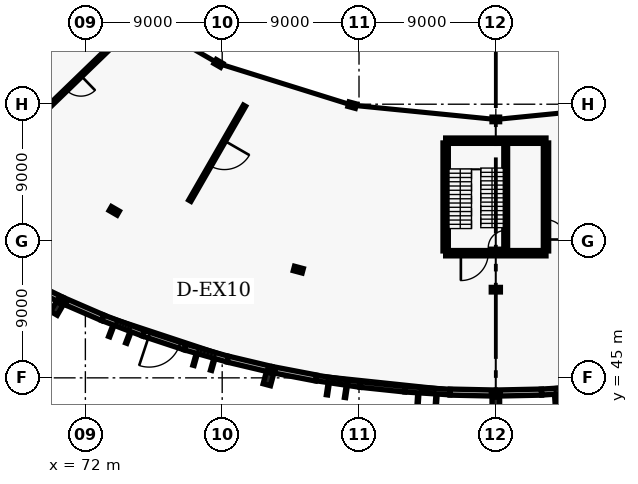
"""IFC4 building model, lengths in metres.
Left out: names, types, materials, properties, quantities, classifications, styles, units other than length and angle.
Written with IfcOpenShell. Run it as: python <this file> out.ifc"""

import sys

from ifc_helpers import new_model, si_unit, direction, frame, frame_2d, origin, origin_2d, place, context, subcontext, project, spatial, rectangle, i_section, extrude, element, fill, save


model = new_model("IFC4")
c1 = context("Model", 3, precision=1e-05, world=origin(), true_north=direction((0.0, 1.0)))
c2 = subcontext(c1, "Body", "Model", "MODEL_VIEW")
j1 = project(units=[si_unit("LENGTHUNIT", "METRE"), si_unit("PLANEANGLEUNIT", "RADIAN")], contexts=[c1])
p1 = place(None, origin())
s1 = spatial("IfcSite", under=j1, at=p1, CompositionType="ELEMENT")
p2 = place(p1, origin())
s2 = spatial("IfcBuilding", under=s1, at=p2, CompositionType="ELEMENT")
p3 = place(p2, origin())
s3 = spatial("IfcBuildingStorey", under=s2, at=p3, CompositionType="ELEMENT", Elevation=0.0)
p4 = place(p3, frame((80.75, 65.684, 0.0), z_axis=(0.0, 0.0, 1.0), x_axis=(-0.5, -0.866025403784, 0.0)))
e1 = element("IfcColumn", 1, at=p4, inside=s3, PredefinedType="COLUMN", context=c2, shape_type="SweptSolid", body=[
    extrude(i_section(OverallWidth=0.3, OverallDepth=0.5, WebThickness=0.014, FlangeThickness=0.028, FilletRadius=0.027, at=origin_2d()), origin(), (0.0, 0.0, 1.0), 5.4),
])
for number, where, z_axis, x_axis in (
    (2, (73.9, 55.985, 0.0), (0.0, 0.0, 1.0), (-0.5, -0.866, 0.0)),
    (3, (70.5, 50.096, 0.0), (0.0, 0.0, 1.0), (-0.5, -0.866, 0.0)),
):
    element("IfcColumn", number, at=place(p3, frame(where, z_axis=z_axis, x_axis=x_axis)), inside=s3, PredefinedType="COLUMN", context=c2, shape_type="SweptSolid", body=[
        extrude(i_section(OverallWidth=0.3, OverallDepth=0.6, WebThickness=0.015, FlangeThickness=0.03, FilletRadius=0.027, at=origin_2d()), origin(), (0.0, 0.0, 1.0), 5.4),
    ])
p5 = place(p3, frame((70.119, 49.569, 0.0), z_axis=(0.0, 0.0, 1.0), x_axis=(-0.5, -0.866025403784, 0.0)))
e4 = element("IfcColumn", 4, at=p5, inside=s3, PredefinedType="PILASTER", context=c2, shape_type="SweptSolid", body=[
    extrude(rectangle(XDim=0.75, YDim=0.5, at=origin_2d()), origin(), (0.0, 0.0, 1.0), 5.15),
])
p6 = place(p3, frame((89.553, 62.937, 0.0), z_axis=(0.0, 0.0, 1.0), x_axis=(-0.258819045103, -0.965925826289, 0.0)))
e5 = element("IfcColumn", 5, at=p6, inside=s3, PredefinedType="COLUMN", context=c2, shape_type="SweptSolid", body=[
    extrude(i_section(OverallWidth=0.3, OverallDepth=0.5, WebThickness=0.014, FlangeThickness=0.028, FilletRadius=0.027, at=origin_2d()), origin(), (0.0, 0.0, 1.0), 5.4),
])
p7 = place(p3, frame((86.007, 52.119, 0.0), z_axis=(0.0, 0.0, 1.0), x_axis=(-0.258819045103, -0.965925826289, 0.0)))
e6 = element("IfcColumn", 6, at=p7, inside=s3, PredefinedType="COLUMN", context=c2, shape_type="SweptSolid", body=[
    extrude(i_section(OverallWidth=0.3, OverallDepth=0.6, WebThickness=0.015, FlangeThickness=0.03, FilletRadius=0.027, at=origin_2d()), origin(), (0.0, 0.0, 1.0), 5.4),
])
p8 = place(p3, frame((84.247, 45.55, 0.0), z_axis=(0.0, 0.0, 1.0), x_axis=(-0.258819045103, -0.965925826289, 0.0)))
e7 = element("IfcColumn", 7, at=p8, inside=s3, PredefinedType="COLUMN", context=c2, shape_type="SweptSolid", body=[
    extrude(i_section(OverallWidth=0.3, OverallDepth=0.5, WebThickness=0.014, FlangeThickness=0.028, FilletRadius=0.027, at=origin_2d()), origin(), (0.0, 0.0, 1.0), 5.4),
])
p9 = place(p3, frame((84.04, 44.934, 0.0), z_axis=(0.0, 0.0, 1.0), x_axis=(-0.258819045103, -0.965925826289, 0.0)))
e8 = element("IfcColumn", 8, at=p9, inside=s3, PredefinedType="PILASTER", context=c2, shape_type="SweptSolid", body=[
    extrude(rectangle(XDim=0.8, YDim=0.5, at=origin_2d()), origin(), (0.0, 0.0, 1.0), 5.15),
])
p10 = place(p3, frame((99.0, 62.0, 0.0), z_axis=(0.0, 0.0, 1.0), x_axis=(0.0, -1.0, 0.0)))
e9 = element("IfcColumn", 9, at=p10, inside=s3, PredefinedType="COLUMN", context=c2, shape_type="SweptSolid", body=[
    extrude(i_section(OverallWidth=0.3, OverallDepth=0.5, WebThickness=0.014, FlangeThickness=0.028, FilletRadius=0.027, at=origin_2d()), origin(), (0.0, 0.0, 1.0), 5.4),
])
for number, where, z_axis, x_axis in (
    (10, (99.0, 50.8, 0.0), (0.0, 0.0, 1.0), (0.0, -1.0, 0.0)),
    (11, (99.0, 44.0, 0.0), (0.0, 0.0, 1.0), (0.0, -1.0, 0.0)),
):
    element("IfcColumn", number, at=place(p3, frame(where, z_axis=z_axis, x_axis=x_axis)), inside=s3, PredefinedType="COLUMN", context=c2, shape_type="SweptSolid", body=[
        extrude(i_section(OverallWidth=0.3, OverallDepth=0.6, WebThickness=0.015, FlangeThickness=0.03, FilletRadius=0.027, at=origin_2d()), origin(), (0.0, 0.0, 1.0), 5.4),
    ])
p11 = place(p3, frame((99.0, 43.35, 0.0), z_axis=(0.0, 0.0, 1.0), x_axis=(0.0, -1.0, 0.0)))
e12 = element("IfcColumn", 12, at=p11, inside=s3, PredefinedType="PILASTER", context=c2, shape_type="SweptSolid", body=[
    extrude(rectangle(XDim=0.75, YDim=0.5, at=origin_2d()), origin(), (0.0, 0.0, 1.0), 5.15),
])
p12 = place(p3, frame((67.934, 51.352, 0.0), z_axis=(0.0, 0.0, 1.0), x_axis=(0.898004688797, -0.439985884886, 0.0)))
e13 = element("IfcWall", 13, at=p12, inside=s3, PredefinedType="SOLIDWALL", context=c2, shape_type="SweptSolid", body=[
    extrude(rectangle(XDim=2.816, YDim=0.4, at=frame_2d((1.408, 0.0))), origin(), (0.0, 0.0, 1.0), 4.6),
])
p13 = place(p3, frame((70.536, 50.079, 0.0), z_axis=(0.0, 0.0, 1.0), x_axis=(0.917744542698, -0.397171190229, 0.0)))
e14 = element("IfcWall", 14, at=p13, inside=s3, PredefinedType="SOLIDWALL", context=c2, shape_type="SweptSolid", body=[
    extrude(rectangle(XDim=2.843, YDim=0.4, at=frame_2d((1.421, 0.0))), origin(), (0.0, 0.0, 1.0), 4.6),
])
p14 = place(p3, frame((73.145, 48.95, 0.0), z_axis=(0.0, 0.0, 1.0), x_axis=(0.934663038469, -0.355534814779, 0.0)))
e15 = element("IfcWall", 15, at=p14, inside=s3, PredefinedType="SOLIDWALL", context=c2, shape_type="SweptSolid", body=[
    extrude(rectangle(XDim=2.866, YDim=0.39, at=frame_2d((1.433, 0.0))), origin(), (0.0, 0.0, 1.0), 4.6),
])
p15 = place(p14, frame((0.908, 0.0, 0.95)))
e16 = element("IfcOpeningElement", 16, at=p15, cuts=e15, PredefinedType="OPENING", context=c2, shape_type="SweptSolid", body=[
    extrude(rectangle(XDim=1.05, YDim=1.35, at=frame_2d((0.525, 0.675))), frame((0.0, 0.205, 0.0), z_axis=(0.0, -1.0, 0.0), x_axis=(1.0, 0.0, 0.0)), (0.0, 0.0, 1.0), 0.41),
])
p16 = place(p3, frame((75.824, 47.931, 0.0), z_axis=(0.0, 0.0, 1.0), x_axis=(0.949374423455, -0.314146787489, 0.0)))
e17 = element("IfcWall", 17, at=p16, inside=s3, PredefinedType="SOLIDWALL", context=c2, shape_type="SweptSolid", body=[
    extrude(rectangle(XDim=2.887, YDim=0.39, at=frame_2d((1.444, 0.0))), origin(), (0.0, 0.0, 1.0), 4.6),
])
p17 = place(p16, frame((0.394, 0.0, 0.0)))
e18 = element("IfcOpeningElement", 18, at=p17, cuts=e17, PredefinedType="OPENING", context=c2, shape_type="SweptSolid", body=[
    extrude(rectangle(XDim=2.1, YDim=2.35, at=frame_2d((1.05, 1.175))), frame((0.0, 0.205, 0.0), z_axis=(0.0, -1.0, 0.0), x_axis=(1.0, 0.0, 0.0)), (0.0, 0.0, 1.0), 0.41),
])
p18 = place(p3, frame((78.565, 47.024, 0.0), z_axis=(0.0, 0.0, 1.0), x_axis=(0.962286948756, -0.272036446555, 0.0)))
e19 = element("IfcWall", 19, at=p18, inside=s3, PredefinedType="SOLIDWALL", context=c2, shape_type="SweptSolid", body=[
    extrude(rectangle(XDim=2.908, YDim=0.39, at=frame_2d((1.454, 0.0))), origin(), (0.0, 0.0, 1.0), 4.6),
])
p19 = place(p18, frame((0.854, 0.0, 0.95)))
e20 = element("IfcOpeningElement", 20, at=p19, cuts=e19, PredefinedType="OPENING", context=c2, shape_type="SweptSolid", body=[
    extrude(rectangle(XDim=1.2, YDim=1.8, at=frame_2d((0.6, 0.9))), frame((0.0, 0.205, 0.0), z_axis=(0.0, -1.0, 0.0), x_axis=(1.0, 0.0, 0.0)), (0.0, 0.0, 1.0), 0.41),
])
p20 = place(p3, frame((81.363, 46.233, 0.0), z_axis=(0.0, 0.0, 1.0), x_axis=(0.973061058114, -0.230547559481, 0.0)))
e21 = element("IfcWall", 21, at=p20, inside=s3, PredefinedType="SOLIDWALL", context=c2, shape_type="SweptSolid", body=[
    extrude(rectangle(XDim=2.923, YDim=0.4, at=frame_2d((1.461, 0.0))), origin(), (0.0, 0.0, 1.0), 4.6),
])
p21 = place(p3, frame((84.286, 45.542, 0.0), z_axis=(0.0, 0.0, 1.0), x_axis=(0.982209662349, -0.187787590612, 0.0)))
e22 = element("IfcWall", 22, at=p21, inside=s3, PredefinedType="SOLIDWALL", context=c2, shape_type="SweptSolid", body=[
    extrude(rectangle(XDim=2.939, YDim=0.4, at=frame_2d((1.47, 0.0))), origin(), (0.0, 0.0, 1.0), 4.6),
])
p22 = place(p3, frame((87.173, 44.99, 0.0), z_axis=(0.0, 0.0, 1.0), x_axis=(0.98927134979, -0.146089686444, 0.0)))
e23 = element("IfcWall", 23, at=p22, inside=s3, PredefinedType="SOLIDWALL", context=c2, shape_type="SweptSolid", body=[
    extrude(rectangle(XDim=2.95, YDim=0.36, at=frame_2d((1.475, 0.0))), origin(), (0.0, 0.0, 1.0), 4.6),
])
p23 = place(p22, frame((0.725, 0.0, 0.95)))
e24 = element("IfcOpeningElement", 24, at=p23, cuts=e23, PredefinedType="OPENING", context=c2, shape_type="SweptSolid", body=[
    extrude(rectangle(XDim=1.5, YDim=2.1, at=frame_2d((0.75, 1.05))), frame((0.0, 0.19, 0.0), z_axis=(0.0, -1.0, 0.0), x_axis=(1.0, 0.0, 0.0)), (0.0, 0.0, 1.0), 0.38),
])
p24 = place(p3, frame((90.091, 44.559, 0.0), z_axis=(0.0, 0.0, 1.0), x_axis=(0.994529838675, -0.10445286011, 0.0)))
e25 = element("IfcWall", 25, at=p24, inside=s3, PredefinedType="SOLIDWALL", context=c2, shape_type="SweptSolid", body=[
    extrude(rectangle(XDim=2.959, YDim=0.36, at=frame_2d((1.479, 0.0))), origin(), (0.0, 0.0, 1.0), 4.6),
])
p25 = place(p3, frame((93.034, 44.25, 0.0), z_axis=(0.0, 0.0, 1.0), x_axis=(0.998008759952, -0.063075471132, 0.0)))
e26 = element("IfcWall", 26, at=p25, inside=s3, PredefinedType="SOLIDWALL", context=c2, shape_type="SweptSolid", body=[
    extrude(rectangle(XDim=2.965, YDim=0.36, at=frame_2d((1.482, 0.0))), origin(), (0.0, 0.0, 1.0), 4.6),
])
p26 = place(p25, frame((0.982, 0.0, 0.95)))
e27 = element("IfcOpeningElement", 27, at=p26, cuts=e26, PredefinedType="OPENING", context=c2, shape_type="SweptSolid", body=[
    extrude(rectangle(XDim=1.0, YDim=1.5, at=frame_2d((0.5, 0.75))), frame((0.0, 0.19, 0.0), z_axis=(0.0, -1.0, 0.0), x_axis=(1.0, 0.0, 0.0)), (0.0, 0.0, 1.0), 0.38),
])
for number, where, z_axis, x_axis in (
    (28, (95.993, 44.063, 0.0), (0.0, 0.0, 1.0), (1.0, -0.021, 0.0)),
    (29, (99.04, 44.0, 0.0), (0.0, 0.0, 1.0), (1.0, 0.021, 0.0)),
):
    element("IfcWall", number, at=place(p3, frame(where, z_axis=z_axis, x_axis=x_axis)), inside=s3, PredefinedType="SOLIDWALL", context=c2, shape_type="SweptSolid", body=[
        extrude(rectangle(XDim=2.968, YDim=0.4, at=frame_2d((1.484, 0.0))), origin(), (0.0, 0.0, 1.0), 4.6),
    ])
p27 = place(p3, frame((102.007, 44.063, 0.0), z_axis=(0.0, 0.0, 1.0), x_axis=(0.998008759952, 0.063075471132, 0.0)))
e30 = element("IfcWall", 30, at=p27, inside=s3, PredefinedType="SOLIDWALL", context=c2, shape_type="SweptSolid", body=[
    extrude(rectangle(XDim=2.965, YDim=0.39, at=frame_2d((1.482, 0.0))), origin(), (0.0, 0.0, 1.0), 4.6),
])
p28 = place(p27, frame((0.882, 0.0, 0.95)))
e31 = element("IfcOpeningElement", 31, at=p28, cuts=e30, PredefinedType="OPENING", context=c2, shape_type="SweptSolid", body=[
    extrude(rectangle(XDim=1.2, YDim=1.8, at=frame_2d((0.6, 0.9))), frame((0.0, 0.205, 0.0), z_axis=(0.0, -1.0, 0.0), x_axis=(1.0, 0.0, 0.0)), (0.0, 0.0, 1.0), 0.41),
])
p29 = place(p3, frame((95.7, 53.2, 0.0), z_axis=(0.0, 0.0, 1.0), x_axis=(1.0, 0.0, 0.0)))
e32 = element("IfcWall", 32, at=p29, inside=s3, PredefinedType="SHEAR", context=c2, shape_type="SweptSolid", body=[
    extrude(rectangle(XDim=6.6, YDim=0.35, at=frame_2d((3.3, 0.0))), origin(), (0.0, 0.0, 1.0), 5.4),
])
p30 = place(p29, frame((1.0, 0.0, 0.0)))
e33 = element("IfcOpeningElement", 33, at=p30, cuts=e32, PredefinedType="OPENING", context=c2, shape_type="SweptSolid", body=[
    extrude(rectangle(XDim=1.8, YDim=2.15, at=frame_2d((0.9, 1.075))), frame((0.0, 0.185, 0.0), z_axis=(0.0, -1.0, 0.0), x_axis=(1.0, 0.0, 0.0)), (0.0, 0.0, 1.0), 0.37),
])
p31 = place(p3, frame((95.7, 60.6, 0.0), z_axis=(0.0, 0.0, 1.0), x_axis=(1.0, 0.0, 0.0)))
e34 = element("IfcWall", 34, at=p31, inside=s3, PredefinedType="SHEAR", context=c2, shape_type="SweptSolid", body=[
    extrude(rectangle(XDim=6.6, YDim=0.35, at=frame_2d((3.3, 0.0))), origin(), (0.0, 0.0, 1.0), 5.4),
])
p32 = place(p3, frame((95.7, 53.35, 0.0), z_axis=(0.0, 0.0, 1.0), x_axis=(0.0, 1.0, 0.0)))
e35 = element("IfcWall", 35, at=p32, inside=s3, PredefinedType="SHEAR", context=c2, shape_type="SweptSolid", body=[
    extrude(rectangle(XDim=7.1, YDim=0.35, at=frame_2d((3.55, 0.0))), origin(), (0.0, 0.0, 1.0), 5.4),
])
p33 = place(p3, frame((102.3, 53.35, 0.0), z_axis=(0.0, 0.0, 1.0), x_axis=(0.0, 1.0, 0.0)))
e36 = element("IfcWall", 36, at=p33, inside=s3, PredefinedType="SHEAR", context=c2, shape_type="SweptSolid", body=[
    extrude(rectangle(XDim=7.1, YDim=0.35, at=frame_2d((3.55, 0.0))), origin(), (0.0, 0.0, 1.0), 5.4),
])
p34 = place(p33, frame((0.75, 0.0, 0.0)))
e37 = element("IfcOpeningElement", 37, at=p34, cuts=e36, PredefinedType="OPENING", context=c2, shape_type="SweptSolid", body=[
    extrude(rectangle(XDim=1.3, YDim=2.15, at=frame_2d((0.65, 1.075))), frame((0.0, 0.185, 0.0), z_axis=(0.0, -1.0, 0.0), x_axis=(1.0, 0.0, 0.0)), (0.0, 0.0, 1.0), 0.37),
])
p35 = place(p3, frame((99.65, 53.35, 0.0), z_axis=(0.0, 0.0, 1.0), x_axis=(0.0, 1.0, 0.0)))
e38 = element("IfcWall", 38, at=p35, inside=s3, PredefinedType="SHEAR", context=c2, shape_type="SweptSolid", body=[
    extrude(rectangle(XDim=7.1, YDim=0.25, at=frame_2d((3.55, 0.0))), origin(), (0.0, 0.0, 1.0), 5.4),
])
p36 = place(p35, frame((0.2, 0.0, 0.0)))
e39 = element("IfcOpeningElement", 39, at=p36, cuts=e38, PredefinedType="OPENING", context=c2, shape_type="SweptSolid", body=[
    extrude(rectangle(XDim=1.15, YDim=2.15, at=frame_2d((0.575, 1.075))), frame((0.0, 0.135, 0.0), z_axis=(0.0, -1.0, 0.0), x_axis=(1.0, 0.0, 0.0)), (0.0, 0.0, 1.0), 0.27),
])
p37 = place(p3, frame((74.028, 67.127, 0.0), z_axis=(0.0, 0.0, 1.0), x_axis=(-0.718851460144, -0.695163706078, 0.0)))
e40 = element("IfcWall", 40, at=p37, inside=s3, PredefinedType="PARTITIONING", context=c2, shape_type="SweptSolid", body=[
    extrude(rectangle(XDim=7.812, YDim=0.18, at=frame_2d((3.906, 0.0))), origin(), (0.0, 0.0, 1.0), 4.3),
])
p38 = place(p37, frame((3.231, 0.0, 0.0)))
e41 = element("IfcOpeningElement", 41, at=p38, cuts=e40, PredefinedType="OPENING", context=c2, shape_type="SweptSolid", body=[
    extrude(rectangle(XDim=1.35, YDim=2.2, at=frame_2d((0.675, 1.1))), frame((0.0, 0.1, 0.0), z_axis=(0.0, -1.0, 0.0), x_axis=(1.0, 0.0, 0.0)), (0.0, 0.0, 1.0), 0.2),
])
p39 = place(p3, frame((82.469, 62.899, 0.0), z_axis=(0.0, 0.0, 1.0), x_axis=(-0.499109384588, -0.866538990592, 0.0)))
e42 = element("IfcWall", 42, at=p39, inside=s3, PredefinedType="PARTITIONING", context=c2, shape_type="SweptSolid", body=[
    extrude(rectangle(XDim=7.207, YDim=0.165, at=frame_2d((3.604, 0.0))), origin(), (0.0, 0.0, 1.0), 4.3),
])
p40 = place(p39, frame((2.653, 0.0, 0.0)))
e43 = element("IfcOpeningElement", 43, at=p40, cuts=e42, PredefinedType="OPENING", context=c2, shape_type="SweptSolid", body=[
    extrude(rectangle(XDim=1.9, YDim=2.35, at=frame_2d((0.95, 1.175))), frame((0.0, 0.093, 0.0), z_axis=(0.0, -1.0, 0.0), x_axis=(1.0, 0.0, 0.0)), (0.0, 0.0, 1.0), 0.185),
])
p41 = place(p15, origin())
e44 = element("IfcWindow", 44, at=p41, inside=s3, PartitioningType="SINGLE_PANEL", PredefinedType="WINDOW", context=c2, shape_type="SweptSolid", body=[
    extrude(rectangle(XDim=1.05, YDim=1.35, at=frame_2d((0.525, 0.675))), frame((0.0, 0.03, 0.0), z_axis=(0.0, -1.0, 0.0), x_axis=(1.0, 0.0, 0.0)), (0.0, 0.0, 1.0), 0.06),
])
fill(e16, e44)
p42 = place(p17, frame((2.1, 0.0, 0.0), z_axis=(0.0, 0.0, 1.0), x_axis=(-1.0, 0.0, 0.0)))
e45 = element("IfcDoor", 45, at=p42, inside=s3, OperationType="DOUBLE_DOOR_SINGLE_SWING", PredefinedType="DOOR", context=c2, shape_type="SweptSolid", body=[
    extrude(rectangle(XDim=2.1, YDim=2.35, at=frame_2d((1.05, 1.175))), frame((0.0, 0.025, 0.0), z_axis=(0.0, -1.0, 0.0), x_axis=(1.0, 0.0, 0.0)), (0.0, 0.0, 1.0), 0.05),
])
fill(e18, e45)
p43 = place(p19, origin())
e46 = element("IfcWindow", 46, at=p43, inside=s3, PartitioningType="SINGLE_PANEL", PredefinedType="WINDOW", context=c2, shape_type="SweptSolid", body=[
    extrude(rectangle(XDim=1.2, YDim=1.8, at=frame_2d((0.6, 0.9))), frame((0.0, 0.03, 0.0), z_axis=(0.0, -1.0, 0.0), x_axis=(1.0, 0.0, 0.0)), (0.0, 0.0, 1.0), 0.06),
])
fill(e20, e46)
p44 = place(p23, origin())
e47 = element("IfcWindow", 47, at=p44, inside=s3, PartitioningType="SINGLE_PANEL", PredefinedType="WINDOW", context=c2, shape_type="SweptSolid", body=[
    extrude(rectangle(XDim=1.5, YDim=2.1, at=frame_2d((0.75, 1.05))), frame((0.0, 0.03, 0.0), z_axis=(0.0, -1.0, 0.0), x_axis=(1.0, 0.0, 0.0)), (0.0, 0.0, 1.0), 0.06),
])
fill(e24, e47)
p45 = place(p26, origin())
e48 = element("IfcWindow", 48, at=p45, inside=s3, PartitioningType="SINGLE_PANEL", PredefinedType="WINDOW", context=c2, shape_type="SweptSolid", body=[
    extrude(rectangle(XDim=1.0, YDim=1.5, at=frame_2d((0.5, 0.75))), frame((0.0, 0.03, 0.0), z_axis=(0.0, -1.0, 0.0), x_axis=(1.0, 0.0, 0.0)), (0.0, 0.0, 1.0), 0.06),
])
fill(e27, e48)
p46 = place(p28, origin())
e49 = element("IfcWindow", 49, at=p46, inside=s3, PartitioningType="SINGLE_PANEL", PredefinedType="WINDOW", context=c2, shape_type="SweptSolid", body=[
    extrude(rectangle(XDim=1.2, YDim=1.8, at=frame_2d((0.6, 0.9))), frame((0.0, 0.03, 0.0), z_axis=(0.0, -1.0, 0.0), x_axis=(1.0, 0.0, 0.0)), (0.0, 0.0, 1.0), 0.06),
])
fill(e31, e49)
p47 = place(p34, frame((1.3, 0.0, 0.0), z_axis=(0.0, 0.0, 1.0), x_axis=(-1.0, 0.0, 0.0)))
e50 = element("IfcDoor", 50, at=p47, inside=s3, OperationType="DOUBLE_DOOR_SINGLE_SWING", PredefinedType="DOOR", context=c2, shape_type="SweptSolid", body=[
    extrude(rectangle(XDim=1.3, YDim=2.15, at=frame_2d((0.65, 1.075))), frame((0.0, 0.025, 0.0), z_axis=(0.0, -1.0, 0.0), x_axis=(1.0, 0.0, 0.0)), (0.0, 0.0, 1.0), 0.05),
])
fill(e37, e50)
p48 = place(p36, origin())
e51 = element("IfcDoor", 51, at=p48, inside=s3, OperationType="SINGLE_SWING_LEFT", PredefinedType="DOOR", context=c2, shape_type="SweptSolid", body=[
    extrude(rectangle(XDim=1.15, YDim=2.15, at=frame_2d((0.575, 1.075))), frame((0.0, 0.025, 0.0), z_axis=(0.0, -1.0, 0.0), x_axis=(1.0, 0.0, 0.0)), (0.0, 0.0, 1.0), 0.05),
])
fill(e39, e51)
p49 = place(p30, frame((1.8, 0.0, 0.0), z_axis=(0.0, 0.0, 1.0), x_axis=(-1.0, 0.0, 0.0)))
e52 = element("IfcDoor", 52, at=p49, inside=s3, OperationType="DOUBLE_DOOR_SINGLE_SWING", PredefinedType="DOOR", context=c2, shape_type="SweptSolid", body=[
    extrude(rectangle(XDim=1.8, YDim=2.15, at=frame_2d((0.9, 1.075))), frame((0.0, 0.025, 0.0), z_axis=(0.0, -1.0, 0.0), x_axis=(1.0, 0.0, 0.0)), (0.0, 0.0, 1.0), 0.05),
])
fill(e33, e52)
p50 = place(p38, origin())
e53 = element("IfcDoor", 53, at=p50, inside=s3, OperationType="SINGLE_SWING_LEFT", PredefinedType="DOOR", context=c2, shape_type="SweptSolid", body=[
    extrude(rectangle(XDim=1.35, YDim=2.2, at=frame_2d((0.675, 1.1))), frame((0.0, 0.025, 0.0), z_axis=(0.0, -1.0, 0.0), x_axis=(1.0, 0.0, 0.0)), (0.0, 0.0, 1.0), 0.05),
])
fill(e41, e53)
p51 = place(p40, origin())
e54 = element("IfcDoor", 54, at=p51, inside=s3, OperationType="DOUBLE_DOOR_SINGLE_SWING", PredefinedType="DOOR", context=c2, shape_type="SweptSolid", body=[
    extrude(rectangle(XDim=1.9, YDim=2.35, at=frame_2d((0.95, 1.175))), frame((0.0, 0.025, 0.0), z_axis=(0.0, -1.0, 0.0), x_axis=(1.0, 0.0, 0.0)), (0.0, 0.0, 1.0), 0.05),
])
fill(e43, e54)
save(model, sys.argv[1])
